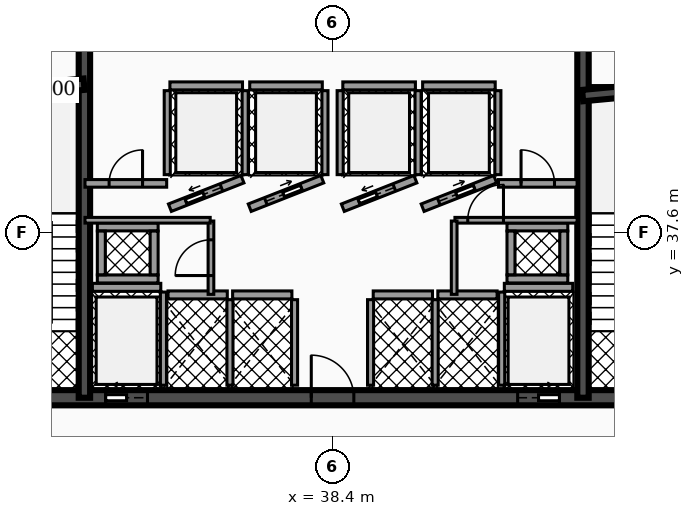
"""IFC4 building model, lengths in metres.
Left out: names, types, materials, properties, quantities, classifications, styles, units other than length and angle.
Written with IfcOpenShell. Run it as: python <this file> out.ifc"""

import sys

from ifc_helpers import new_model, si_unit, direction, frame, frame_2d, origin, place, context, subcontext, project, spatial, rectangle, extrude, element, fill, save


model = new_model("IFC4")
c1 = context("Model", 3, precision=1e-05, world=origin(), true_north=direction((0.0, 1.0)))
c2 = subcontext(c1, "Body", "Model", "MODEL_VIEW")
j1 = project(units=[si_unit("LENGTHUNIT", "METRE"), si_unit("PLANEANGLEUNIT", "RADIAN")], contexts=[c1])
p1 = place(None, origin())
s1 = spatial("IfcSite", under=j1, at=p1, CompositionType="ELEMENT")
p2 = place(p1, origin())
s2 = spatial("IfcBuilding", under=s1, at=p2, CompositionType="ELEMENT")
p3 = place(p2, frame((0.0, 0.0, 39.78)))
s3 = spatial("IfcBuildingStorey", under=s2, at=p3, CompositionType="ELEMENT", Elevation=39.78)
p4 = place(p3, frame((28.4, 33.25, 0.0), z_axis=(0.0, 0.0, 1.0), x_axis=(1.0, 0.0, 0.0)))
e1 = element("IfcWall", 1, at=p4, inside=s3, PredefinedType="SHEAR", context=c2, shape_type="SweptSolid", body=[
    extrude(rectangle(XDim=20.06, YDim=0.4, at=frame_2d((10.03, 0.0))), origin(), (0.0, 0.0, 1.0), 3.82),
])
p5 = place(p4, frame((4.03, 0.0, 0.0)))
e2 = element("IfcOpeningElement", 2, at=p5, cuts=e1, PredefinedType="OPENING", context=c2, shape_type="SweptSolid", body=[
    extrude(rectangle(XDim=1.1, YDim=2.15, at=frame_2d((0.55, 1.075))), frame((0.0, 0.21, 0.0), z_axis=(0.0, -1.0, 0.0), x_axis=(1.0, 0.0, 0.0)), (0.0, 0.0, 1.0), 0.42),
])
p6 = place(p4, frame((14.87, 0.0, 0.0)))
e3 = element("IfcOpeningElement", 3, at=p6, cuts=e1, PredefinedType="OPENING", context=c2, shape_type="SweptSolid", body=[
    extrude(rectangle(XDim=1.1, YDim=2.15, at=frame_2d((0.55, 1.075))), frame((0.0, 0.21, 0.0), z_axis=(0.0, -1.0, 0.0), x_axis=(1.0, 0.0, 0.0)), (0.0, 0.0, 1.0), 0.42),
])
p7 = place(p4, frame((1.31, 0.0, 0.0)))
e4 = element("IfcOpeningElement", 4, at=p7, cuts=e1, PredefinedType="OPENING", context=c2, shape_type="SweptSolid", body=[
    extrude(rectangle(XDim=1.1, YDim=2.2, at=frame_2d((0.55, 1.1))), frame((0.0, 0.21, 0.0), z_axis=(0.0, -1.0, 0.0), x_axis=(1.0, 0.0, 0.0)), (0.0, 0.0, 1.0), 0.42),
])
p8 = place(p4, frame((9.44, 0.0, 0.0)))
e5 = element("IfcOpeningElement", 5, at=p8, cuts=e1, PredefinedType="OPENING", context=c2, shape_type="SweptSolid", body=[
    extrude(rectangle(XDim=1.12, YDim=2.05, at=frame_2d((0.56, 1.025))), frame((0.0, 0.21, 0.0), z_axis=(0.0, -1.0, 0.0), x_axis=(1.0, 0.0, 0.0)), (0.0, 0.0, 1.0), 0.42),
])
p9 = place(p4, frame((17.65, 0.0, 0.0)))
e6 = element("IfcOpeningElement", 6, at=p9, cuts=e1, PredefinedType="OPENING", context=c2, shape_type="SweptSolid", body=[
    extrude(rectangle(XDim=1.1, YDim=2.2, at=frame_2d((0.55, 1.1))), frame((0.0, 0.21, 0.0), z_axis=(0.0, -1.0, 0.0), x_axis=(1.0, 0.0, 0.0)), (0.0, 0.0, 1.0), 0.42),
])
for number, where, z_axis, x_axis in (
    (7, (31.87, 33.25, 0.0), (0.0, 0.0, 1.0), (0.0, 1.0, 0.0)),
    (8, (44.99, 33.25, 0.0), (0.0, 0.0, 1.0), (0.0, 1.0, 0.0)),
):
    element("IfcWall", number, at=place(p3, frame(where, z_axis=z_axis, x_axis=x_axis)), inside=s3, PredefinedType="SHEAR", context=c2, shape_type="SweptSolid", body=[
        extrude(rectangle(XDim=10.2, YDim=0.3, at=frame_2d((5.1, 0.0))), origin(), (0.0, 0.0, 1.0), 3.82),
    ])
p10 = place(p3, frame((28.64, 41.2, 0.0), z_axis=(0.0, 0.0, 1.0), x_axis=(0.995687118776, 0.092774789157, 0.0)))
e9 = element("IfcWall", 9, at=p10, inside=s3, PredefinedType="SHEAR", context=c2, shape_type="SweptSolid", body=[
    extrude(rectangle(XDim=3.234, YDim=0.3, at=frame_2d((1.617, 0.0))), origin(), (0.0, 0.0, 1.0), 3.82),
])
p11 = place(p3, frame((44.98, 41.2, 0.0), z_axis=(0.0, 0.0, 1.0), x_axis=(0.995686468965, 0.09278176286, 0.0)))
e10 = element("IfcWall", 10, at=p11, inside=s3, PredefinedType="SHEAR", context=c2, shape_type="SweptSolid", body=[
    extrude(rectangle(XDim=3.234, YDim=0.3, at=frame_2d((1.617, 0.0))), origin(), (0.0, 0.0, 1.0), 3.82),
])
p12 = place(p3, frame((32.08, 36.155, 0.0), z_axis=(0.0, 0.0, 1.0), x_axis=(1.0, 0.0, 0.0)))
e11 = element("IfcWall", 11, at=p12, inside=s3, PredefinedType="SOLIDWALL", context=c2, shape_type="SweptSolid", body=[
    extrude(rectangle(XDim=1.8, YDim=0.21, at=frame_2d((0.9, 0.0))), origin(), (0.0, 0.0, 1.0), 2.792),
])
p13 = place(p3, frame((33.95, 33.58, 0.0), z_axis=(0.0, 0.0, 1.0), x_axis=(0.0, 1.0, 0.0)))
e12 = element("IfcWall", 12, at=p13, inside=s3, PredefinedType="SOLIDWALL", context=c2, shape_type="SweptSolid", body=[
    extrude(rectangle(XDim=2.45, YDim=0.16, at=frame_2d((1.225, 0.0))), origin(), (0.0, 0.0, 1.0), 2.792),
])
p14 = place(p3, frame((42.92, 36.155, 0.0), z_axis=(0.0, 0.0, 1.0), x_axis=(1.0, 0.0, 0.0)))
e13 = element("IfcWall", 13, at=p14, inside=s3, PredefinedType="SOLIDWALL", context=c2, shape_type="SweptSolid", body=[
    extrude(rectangle(XDim=1.8, YDim=0.21, at=frame_2d((0.9, 0.0))), origin(), (0.0, 0.0, 1.0), 2.792),
])
p15 = place(p3, frame((42.85, 33.58, 0.0), z_axis=(0.0, 0.0, 1.0), x_axis=(0.0, 1.0, 0.0)))
e14 = element("IfcWall", 14, at=p15, inside=s3, PredefinedType="SOLIDWALL", context=c2, shape_type="SweptSolid", body=[
    extrude(rectangle(XDim=2.45, YDim=0.16, at=frame_2d((1.225, 0.0))), origin(), (0.0, 0.0, 1.0), 2.792),
])
p16 = place(p3, frame((34.12, 38.25, 0.0), z_axis=(0.0, 0.0, 1.0), x_axis=(0.930804993012, 0.36551616241, 0.0)))
e15 = element("IfcWall", 15, at=p16, inside=s3, PredefinedType="SOLIDWALL", context=c2, shape_type="SweptSolid", body=[
    extrude(rectangle(XDim=2.052, YDim=0.21, at=frame_2d((1.026, 0.0))), origin(), (0.0, 0.0, 1.0), 2.792),
])
p17 = place(p16, frame((0.455, 0.0, 0.0)))
e16 = element("IfcOpeningElement", 16, at=p17, cuts=e15, PredefinedType="OPENING", context=c2, shape_type="SweptSolid", body=[
    extrude(rectangle(XDim=1.0, YDim=2.1, at=frame_2d((0.5, 1.05))), frame((0.0, 0.115, 0.0), z_axis=(0.0, -1.0, 0.0), x_axis=(1.0, 0.0, 0.0)), (0.0, 0.0, 1.0), 0.23),
])
p18 = place(p3, frame((34.12, 41.455, 0.0), z_axis=(0.0, 0.0, 1.0), x_axis=(1.0, 0.0, 0.0)))
e17 = element("IfcWall", 17, at=p18, inside=s3, PredefinedType="SOLIDWALL", context=c2, shape_type="SweptSolid", body=[
    extrude(rectangle(XDim=1.91, YDim=0.21, at=frame_2d((0.955, 0.0))), origin(), (0.0, 0.0, 1.0), 2.792),
])
for number, where, z_axis, x_axis in (
    (18, (34.05, 39.12, 0.0), (0.0, 0.0, 1.0), (0.0, 1.0, 0.0)),
    (19, (36.1, 39.12, 0.0), (0.0, 0.0, 1.0), (0.0, 1.0, 0.0)),
):
    element("IfcWall", number, at=place(p3, frame(where, z_axis=z_axis, x_axis=x_axis)), inside=s3, PredefinedType="SOLIDWALL", context=c2, shape_type="SweptSolid", body=[
        extrude(rectangle(XDim=2.21, YDim=0.16, at=frame_2d((1.105, 0.0))), origin(), (0.0, 0.0, 1.0), 2.792),
    ])
p19 = place(p3, frame((36.22, 38.25, 0.0), z_axis=(0.0, 0.0, 1.0), x_axis=(0.930804993012, 0.36551616241, 0.0)))
e20 = element("IfcWall", 20, at=p19, inside=s3, PredefinedType="SOLIDWALL", context=c2, shape_type="SweptSolid", body=[
    extrude(rectangle(XDim=2.052, YDim=0.21, at=frame_2d((1.026, 0.0))), origin(), (0.0, 0.0, 1.0), 2.792),
])
p20 = place(p19, frame((0.455, 0.0, 0.0)))
e21 = element("IfcOpeningElement", 21, at=p20, cuts=e20, PredefinedType="OPENING", context=c2, shape_type="SweptSolid", body=[
    extrude(rectangle(XDim=1.0, YDim=2.1, at=frame_2d((0.5, 1.05))), frame((0.0, 0.115, 0.0), z_axis=(0.0, -1.0, 0.0), x_axis=(1.0, 0.0, 0.0)), (0.0, 0.0, 1.0), 0.23),
])
p21 = place(p3, frame((36.22, 41.455, 0.0), z_axis=(0.0, 0.0, 1.0), x_axis=(1.0, 0.0, 0.0)))
e22 = element("IfcWall", 22, at=p21, inside=s3, PredefinedType="SOLIDWALL", context=c2, shape_type="SweptSolid", body=[
    extrude(rectangle(XDim=1.91, YDim=0.21, at=frame_2d((0.955, 0.0))), origin(), (0.0, 0.0, 1.0), 2.792),
])
p22 = place(p3, frame((38.2, 39.12, 0.0), z_axis=(0.0, 0.0, 1.0), x_axis=(0.0, 1.0, 0.0)))
e23 = element("IfcWall", 23, at=p22, inside=s3, PredefinedType="SOLIDWALL", context=c2, shape_type="SweptSolid", body=[
    extrude(rectangle(XDim=2.21, YDim=0.16, at=frame_2d((1.105, 0.0))), origin(), (0.0, 0.0, 1.0), 2.792),
])
p23 = place(p3, frame((38.67, 38.25, 0.0), z_axis=(0.0, 0.0, 1.0), x_axis=(0.930820886763, 0.3654756856, 0.0)))
e24 = element("IfcWall", 24, at=p23, inside=s3, PredefinedType="SOLIDWALL", context=c2, shape_type="SweptSolid", body=[
    extrude(rectangle(XDim=2.052, YDim=0.21, at=frame_2d((1.026, 0.0))), origin(), (0.0, 0.0, 1.0), 2.792),
])
p24 = place(p23, frame((0.455, 0.0, 0.0)))
e25 = element("IfcOpeningElement", 25, at=p24, cuts=e24, PredefinedType="OPENING", context=c2, shape_type="SweptSolid", body=[
    extrude(rectangle(XDim=1.0, YDim=2.1, at=frame_2d((0.5, 1.05))), frame((0.0, 0.115, 0.0), z_axis=(0.0, -1.0, 0.0), x_axis=(1.0, 0.0, 0.0)), (0.0, 0.0, 1.0), 0.23),
])
p25 = place(p3, frame((38.67, 41.455, 0.0), z_axis=(0.0, 0.0, 1.0), x_axis=(1.0, 0.0, 0.0)))
e26 = element("IfcWall", 26, at=p25, inside=s3, PredefinedType="SOLIDWALL", context=c2, shape_type="SweptSolid", body=[
    extrude(rectangle(XDim=1.91, YDim=0.21, at=frame_2d((0.955, 0.0))), origin(), (0.0, 0.0, 1.0), 2.792),
])
for number, where, z_axis, x_axis in (
    (27, (38.6, 39.12, 0.0), (0.0, 0.0, 1.0), (0.0, 1.0, 0.0)),
    (28, (40.65, 39.12, 0.0), (0.0, 0.0, 1.0), (0.0, 1.0, 0.0)),
):
    element("IfcWall", number, at=place(p3, frame(where, z_axis=z_axis, x_axis=x_axis)), inside=s3, PredefinedType="SOLIDWALL", context=c2, shape_type="SweptSolid", body=[
        extrude(rectangle(XDim=2.21, YDim=0.16, at=frame_2d((1.105, 0.0))), origin(), (0.0, 0.0, 1.0), 2.792),
    ])
p26 = place(p3, frame((40.77, 38.25, 0.0), z_axis=(0.0, 0.0, 1.0), x_axis=(0.930804993012, 0.36551616241, 0.0)))
e29 = element("IfcWall", 29, at=p26, inside=s3, PredefinedType="SOLIDWALL", context=c2, shape_type="SweptSolid", body=[
    extrude(rectangle(XDim=2.052, YDim=0.21, at=frame_2d((1.026, 0.0))), origin(), (0.0, 0.0, 1.0), 2.792),
])
p27 = place(p26, frame((0.455, 0.0, 0.0)))
e30 = element("IfcOpeningElement", 30, at=p27, cuts=e29, PredefinedType="OPENING", context=c2, shape_type="SweptSolid", body=[
    extrude(rectangle(XDim=1.0, YDim=2.1, at=frame_2d((0.5, 1.05))), frame((0.0, 0.115, 0.0), z_axis=(0.0, -1.0, 0.0), x_axis=(1.0, 0.0, 0.0)), (0.0, 0.0, 1.0), 0.23),
])
p28 = place(p3, frame((40.77, 41.455, 0.0), z_axis=(0.0, 0.0, 1.0), x_axis=(1.0, 0.0, 0.0)))
e31 = element("IfcWall", 31, at=p28, inside=s3, PredefinedType="SOLIDWALL", context=c2, shape_type="SweptSolid", body=[
    extrude(rectangle(XDim=1.91, YDim=0.21, at=frame_2d((0.955, 0.0))), origin(), (0.0, 0.0, 1.0), 2.792),
])
p29 = place(p3, frame((42.75, 39.12, 0.0), z_axis=(0.0, 0.0, 1.0), x_axis=(0.0, 1.0, 0.0)))
e32 = element("IfcWall", 32, at=p29, inside=s3, PredefinedType="SOLIDWALL", context=c2, shape_type="SweptSolid", body=[
    extrude(rectangle(XDim=2.21, YDim=0.16, at=frame_2d((1.105, 0.0))), origin(), (0.0, 0.0, 1.0), 2.792),
])
p30 = place(p3, frame((34.07, 35.955, 0.0), z_axis=(0.0, 0.0, 1.0), x_axis=(1.0, 0.0, 0.0)))
e33 = element("IfcWall", 33, at=p30, inside=s3, PredefinedType="SOLIDWALL", context=c2, shape_type="SweptSolid", body=[
    extrude(rectangle(XDim=1.56, YDim=0.21, at=frame_2d((0.78, 0.0))), origin(), (0.0, 0.0, 1.0), 2.792),
])
p31 = place(p3, frame((35.7, 33.58, 0.0), z_axis=(0.0, 0.0, 1.0), x_axis=(0.0, 1.0, 0.0)))
e34 = element("IfcWall", 34, at=p31, inside=s3, PredefinedType="SOLIDWALL", context=c2, shape_type="SweptSolid", body=[
    extrude(rectangle(XDim=2.25, YDim=0.16, at=frame_2d((1.125, 0.0))), origin(), (0.0, 0.0, 1.0), 2.792),
])
p32 = place(p3, frame((35.77, 35.955, 0.0), z_axis=(0.0, 0.0, 1.0), x_axis=(1.0, 0.0, 0.0)))
e35 = element("IfcWall", 35, at=p32, inside=s3, PredefinedType="SOLIDWALL", context=c2, shape_type="SweptSolid", body=[
    extrude(rectangle(XDim=1.56, YDim=0.21, at=frame_2d((0.78, 0.0))), origin(), (0.0, 0.0, 1.0), 2.792),
])
p33 = place(p3, frame((37.4, 33.58, 0.0), z_axis=(0.0, 0.0, 1.0), x_axis=(0.0, 1.0, 0.0)))
e36 = element("IfcWall", 36, at=p33, inside=s3, PredefinedType="SOLIDWALL", context=c2, shape_type="SweptSolid", body=[
    extrude(rectangle(XDim=2.25, YDim=0.16, at=frame_2d((1.125, 0.0))), origin(), (0.0, 0.0, 1.0), 2.792),
])
p34 = place(p3, frame((39.47, 35.955, 0.0), z_axis=(0.0, 0.0, 1.0), x_axis=(1.0, 0.0, 0.0)))
e37 = element("IfcWall", 37, at=p34, inside=s3, PredefinedType="SOLIDWALL", context=c2, shape_type="SweptSolid", body=[
    extrude(rectangle(XDim=1.56, YDim=0.21, at=frame_2d((0.78, 0.0))), origin(), (0.0, 0.0, 1.0), 2.792),
])
for number, where, z_axis, x_axis in (
    (38, (39.4, 33.58, 0.0), (0.0, 0.0, 1.0), (0.0, 1.0, 0.0)),
    (39, (41.1, 33.58, 0.0), (0.0, 0.0, 1.0), (0.0, 1.0, 0.0)),
):
    element("IfcWall", number, at=place(p3, frame(where, z_axis=z_axis, x_axis=x_axis)), inside=s3, PredefinedType="SOLIDWALL", context=c2, shape_type="SweptSolid", body=[
        extrude(rectangle(XDim=2.25, YDim=0.16, at=frame_2d((1.125, 0.0))), origin(), (0.0, 0.0, 1.0), 2.792),
    ])
p35 = place(p3, frame((41.17, 35.955, 0.0), z_axis=(0.0, 0.0, 1.0), x_axis=(1.0, 0.0, 0.0)))
e40 = element("IfcWall", 40, at=p35, inside=s3, PredefinedType="SOLIDWALL", context=c2, shape_type="SweptSolid", body=[
    extrude(rectangle(XDim=1.56, YDim=0.21, at=frame_2d((0.78, 0.0))), origin(), (0.0, 0.0, 1.0), 2.792),
])
for number, where, z_axis, x_axis in (
    (41, (32.21, 36.375, 0.0), (0.0, 0.0, 1.0), (1.0, 0.0, 0.0)),
    (42, (32.21, 37.745, 0.0), (0.0, 0.0, 1.0), (1.0, 0.0, 0.0)),
):
    element("IfcWall", number, at=place(p3, frame(where, z_axis=z_axis, x_axis=x_axis)), inside=s3, PredefinedType="SOLIDWALL", context=c2, shape_type="SweptSolid", body=[
        extrude(rectangle(XDim=1.6, YDim=0.21, at=frame_2d((0.8, 0.0))), origin(), (0.0, 0.0, 1.0), 3.82),
    ])
for number, where, z_axis, x_axis in (
    (43, (32.315, 36.485, 0.0), (0.0, 0.0, 1.0), (0.0, 1.0, 0.0)),
    (44, (33.705, 36.485, 0.0), (0.0, 0.0, 1.0), (0.0, 1.0, 0.0)),
):
    element("IfcWall", number, at=place(p3, frame(where, z_axis=z_axis, x_axis=x_axis)), inside=s3, PredefinedType="SOLIDWALL", context=c2, shape_type="SweptSolid", body=[
        extrude(rectangle(XDim=1.15, YDim=0.21, at=frame_2d((0.575, 0.0))), origin(), (0.0, 0.0, 1.0), 3.82),
    ])
for number, where, z_axis, x_axis in (
    (45, (42.99, 36.375, 0.0), (0.0, 0.0, 1.0), (1.0, 0.0, 0.0)),
    (46, (42.99, 37.745, 0.0), (0.0, 0.0, 1.0), (1.0, 0.0, 0.0)),
):
    element("IfcWall", number, at=place(p3, frame(where, z_axis=z_axis, x_axis=x_axis)), inside=s3, PredefinedType="SOLIDWALL", context=c2, shape_type="SweptSolid", body=[
        extrude(rectangle(XDim=1.6, YDim=0.21, at=frame_2d((0.8, 0.0))), origin(), (0.0, 0.0, 1.0), 3.82),
    ])
for number, where, z_axis, x_axis in (
    (47, (43.095, 36.485, 0.0), (0.0, 0.0, 1.0), (0.0, 1.0, 0.0)),
    (48, (44.485, 36.485, 0.0), (0.0, 0.0, 1.0), (0.0, 1.0, 0.0)),
):
    element("IfcWall", number, at=place(p3, frame(where, z_axis=z_axis, x_axis=x_axis)), inside=s3, PredefinedType="SOLIDWALL", context=c2, shape_type="SweptSolid", body=[
        extrude(rectangle(XDim=1.15, YDim=0.21, at=frame_2d((0.575, 0.0))), origin(), (0.0, 0.0, 1.0), 3.82),
    ])
p36 = place(p3, frame((35.2, 35.97, 0.0), z_axis=(0.0, 0.0, 1.0), x_axis=(0.0, 1.0, 0.0)))
e49 = element("IfcWall", 49, at=p36, inside=s3, PredefinedType="PARTITIONING", context=c2, shape_type="SweptSolid", body=[
    extrude(rectangle(XDim=1.93, YDim=0.15, at=frame_2d((0.965, 0.0))), origin(), (0.0, 0.0, 1.0), 2.777),
])
p37 = place(p36, frame((0.495, 0.0, 0.0)))
e50 = element("IfcOpeningElement", 50, at=p37, cuts=e49, PredefinedType="OPENING", context=c2, shape_type="SweptSolid", body=[
    extrude(rectangle(XDim=0.94, YDim=2.05, at=frame_2d((0.47, 1.025))), frame((0.0, 0.085, 0.0), z_axis=(0.0, -1.0, 0.0), x_axis=(1.0, 0.0, 0.0)), (0.0, 0.0, 1.0), 0.17),
])
p38 = place(p3, frame((31.885, 37.92, 0.0), z_axis=(0.0, 0.0, 1.0), x_axis=(1.0, 0.0, 0.0)))
e51 = element("IfcWall", 51, at=p38, inside=s3, PredefinedType="PARTITIONING", context=c2, shape_type="SweptSolid", body=[
    extrude(rectangle(XDim=3.295, YDim=0.15, at=frame_2d((1.647, 0.0))), origin(), (0.0, 0.0, 1.0), 2.777),
])
p39 = place(p3, frame((31.885, 38.89, 0.0), z_axis=(0.0, 0.0, 1.0), x_axis=(1.0, 0.0, 0.0)))
e52 = element("IfcWall", 52, at=p39, inside=s3, PredefinedType="PARTITIONING", context=c2, shape_type="SweptSolid", body=[
    extrude(rectangle(XDim=2.15, YDim=0.2, at=frame_2d((1.075, 0.0))), origin(), (0.0, 0.0, 1.0), 2.777),
])
p40 = place(p39, frame((0.635, 0.0, 0.0)))
e53 = element("IfcOpeningElement", 53, at=p40, cuts=e52, PredefinedType="OPENING", context=c2, shape_type="SweptSolid", body=[
    extrude(rectangle(XDim=0.88, YDim=2.05, at=frame_2d((0.44, 1.025))), frame((0.0, 0.11, 0.0), z_axis=(0.0, -1.0, 0.0), x_axis=(1.0, 0.0, 0.0)), (0.0, 0.0, 1.0), 0.22),
])
p41 = place(p3, frame((42.765, 38.89, 0.0), z_axis=(0.0, 0.0, 1.0), x_axis=(1.0, 0.0, 0.0)))
e54 = element("IfcWall", 54, at=p41, inside=s3, PredefinedType="PARTITIONING", context=c2, shape_type="SweptSolid", body=[
    extrude(rectangle(XDim=2.07, YDim=0.2, at=frame_2d((1.035, 0.0))), origin(), (0.0, 0.0, 1.0), 2.777),
])
p42 = place(p41, frame((0.595, 0.0, 0.0)))
e55 = element("IfcOpeningElement", 55, at=p42, cuts=e54, PredefinedType="OPENING", context=c2, shape_type="SweptSolid", body=[
    extrude(rectangle(XDim=0.88, YDim=2.05, at=frame_2d((0.44, 1.025))), frame((0.0, 0.11, 0.0), z_axis=(0.0, -1.0, 0.0), x_axis=(1.0, 0.0, 0.0)), (0.0, 0.0, 1.0), 0.22),
])
p43 = place(p3, frame((41.62, 37.92, 0.0), z_axis=(0.0, 0.0, 1.0), x_axis=(1.0, 0.0, 0.0)))
e56 = element("IfcWall", 56, at=p43, inside=s3, PredefinedType="PARTITIONING", context=c2, shape_type="SweptSolid", body=[
    extrude(rectangle(XDim=3.215, YDim=0.15, at=frame_2d((1.607, 0.0))), origin(), (0.0, 0.0, 1.0), 2.777),
])
p44 = place(p43, frame((0.337, 0.0, 0.0)))
e57 = element("IfcOpeningElement", 57, at=p44, cuts=e56, PredefinedType="OPENING", context=c2, shape_type="SweptSolid", body=[
    extrude(rectangle(XDim=0.94, YDim=2.05, at=frame_2d((0.47, 1.025))), frame((0.0, 0.085, 0.0), z_axis=(0.0, -1.0, 0.0), x_axis=(1.0, 0.0, 0.0)), (0.0, 0.0, 1.0), 0.17),
])
p45 = place(p3, frame((41.6, 35.97, 0.0), z_axis=(0.0, 0.0, 1.0), x_axis=(0.0, 1.0, 0.0)))
e58 = element("IfcWall", 58, at=p45, inside=s3, PredefinedType="PARTITIONING", context=c2, shape_type="SweptSolid", body=[
    extrude(rectangle(XDim=1.93, YDim=0.15, at=frame_2d((0.965, 0.0))), origin(), (0.0, 0.0, 1.0), 2.777),
])
p46 = place(p5, origin())
e59 = element("IfcDoor", 59, at=p46, inside=s3, OperationType="SLIDING_TO_LEFT", PredefinedType="DOOR", context=c2, shape_type="SweptSolid", body=[
    extrude(rectangle(XDim=1.1, YDim=2.15, at=frame_2d((0.55, 1.075))), frame((0.0, 0.025, 0.0), z_axis=(0.0, -1.0, 0.0), x_axis=(1.0, 0.0, 0.0)), (0.0, 0.0, 1.0), 0.05),
])
fill(e2, e59)
p47 = place(p6, origin())
e60 = element("IfcDoor", 60, at=p47, inside=s3, OperationType="SLIDING_TO_RIGHT", PredefinedType="DOOR", context=c2, shape_type="SweptSolid", body=[
    extrude(rectangle(XDim=1.1, YDim=2.15, at=frame_2d((0.55, 1.075))), frame((0.0, 0.025, 0.0), z_axis=(0.0, -1.0, 0.0), x_axis=(1.0, 0.0, 0.0)), (0.0, 0.0, 1.0), 0.05),
])
fill(e3, e60)
p48 = place(p17, origin())
e61 = element("IfcDoor", 61, at=p48, inside=s3, OperationType="SLIDING_TO_LEFT", PredefinedType="DOOR", context=c2, shape_type="SweptSolid", body=[
    extrude(rectangle(XDim=1.0, YDim=2.1, at=frame_2d((0.5, 1.05))), frame((0.0, 0.025, 0.0), z_axis=(0.0, -1.0, 0.0), x_axis=(1.0, 0.0, 0.0)), (0.0, 0.0, 1.0), 0.05),
])
fill(e16, e61)
p49 = place(p20, origin())
e62 = element("IfcDoor", 62, at=p49, inside=s3, OperationType="SLIDING_TO_RIGHT", PredefinedType="DOOR", context=c2, shape_type="SweptSolid", body=[
    extrude(rectangle(XDim=1.0, YDim=2.1, at=frame_2d((0.5, 1.05))), frame((0.0, 0.025, 0.0), z_axis=(0.0, -1.0, 0.0), x_axis=(1.0, 0.0, 0.0)), (0.0, 0.0, 1.0), 0.05),
])
fill(e21, e62)
p50 = place(p24, origin())
e63 = element("IfcDoor", 63, at=p50, inside=s3, OperationType="SLIDING_TO_LEFT", PredefinedType="DOOR", context=c2, shape_type="SweptSolid", body=[
    extrude(rectangle(XDim=1.0, YDim=2.1, at=frame_2d((0.5, 1.05))), frame((0.0, 0.025, 0.0), z_axis=(0.0, -1.0, 0.0), x_axis=(1.0, 0.0, 0.0)), (0.0, 0.0, 1.0), 0.05),
])
fill(e25, e63)
p51 = place(p27, origin())
e64 = element("IfcDoor", 64, at=p51, inside=s3, OperationType="SLIDING_TO_RIGHT", PredefinedType="DOOR", context=c2, shape_type="SweptSolid", body=[
    extrude(rectangle(XDim=1.0, YDim=2.1, at=frame_2d((0.5, 1.05))), frame((0.0, 0.025, 0.0), z_axis=(0.0, -1.0, 0.0), x_axis=(1.0, 0.0, 0.0)), (0.0, 0.0, 1.0), 0.05),
])
fill(e30, e64)
p52 = place(p8, origin())
e65 = element("IfcDoor", 65, at=p52, inside=s3, OperationType="SINGLE_SWING_LEFT", PredefinedType="DOOR", context=c2, shape_type="SweptSolid", body=[
    extrude(rectangle(XDim=1.12, YDim=2.05, at=frame_2d((0.56, 1.025))), frame((0.0, 0.025, 0.0), z_axis=(0.0, -1.0, 0.0), x_axis=(1.0, 0.0, 0.0)), (0.0, 0.0, 1.0), 0.05),
])
fill(e5, e65)
p53 = place(p37, origin())
e66 = element("IfcDoor", 66, at=p53, inside=s3, OperationType="SINGLE_SWING_LEFT", PredefinedType="DOOR", context=c2, shape_type="SweptSolid", body=[
    extrude(rectangle(XDim=0.94, YDim=2.05, at=frame_2d((0.47, 1.025))), frame((0.0, 0.025, 0.0), z_axis=(0.0, -1.0, 0.0), x_axis=(1.0, 0.0, 0.0)), (0.0, 0.0, 1.0), 0.05),
])
fill(e50, e66)
p54 = place(p40, origin())
e67 = element("IfcDoor", 67, at=p54, inside=s3, OperationType="SINGLE_SWING_RIGHT", PredefinedType="DOOR", context=c2, shape_type="SweptSolid", body=[
    extrude(rectangle(XDim=0.88, YDim=2.05, at=frame_2d((0.44, 1.025))), frame((0.0, 0.025, 0.0), z_axis=(0.0, -1.0, 0.0), x_axis=(1.0, 0.0, 0.0)), (0.0, 0.0, 1.0), 0.05),
])
fill(e53, e67)
p55 = place(p42, origin())
e68 = element("IfcDoor", 68, at=p55, inside=s3, OperationType="SINGLE_SWING_LEFT", PredefinedType="DOOR", context=c2, shape_type="SweptSolid", body=[
    extrude(rectangle(XDim=0.88, YDim=2.05, at=frame_2d((0.44, 1.025))), frame((0.0, 0.025, 0.0), z_axis=(0.0, -1.0, 0.0), x_axis=(1.0, 0.0, 0.0)), (0.0, 0.0, 1.0), 0.05),
])
fill(e55, e68)
p56 = place(p44, origin())
e69 = element("IfcDoor", 69, at=p56, inside=s3, OperationType="SINGLE_SWING_RIGHT", PredefinedType="DOOR", context=c2, shape_type="SweptSolid", body=[
    extrude(rectangle(XDim=0.94, YDim=2.05, at=frame_2d((0.47, 1.025))), frame((0.0, 0.025, 0.0), z_axis=(0.0, -1.0, 0.0), x_axis=(1.0, 0.0, 0.0)), (0.0, 0.0, 1.0), 0.05),
])
fill(e57, e69)
save(model, sys.argv[1])
